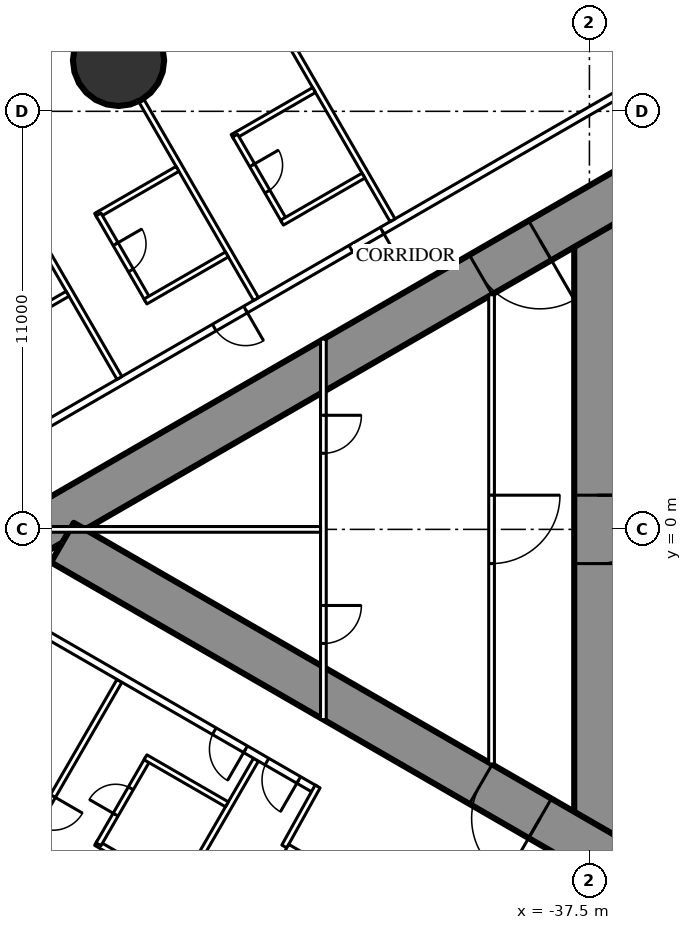
"""IFC4 building model, lengths in metres.
Left out: names, types, materials, properties, quantities, classifications, styles, units other than length and angle.
Written with IfcOpenShell. Run it as: python <this file> out.ifc"""

import sys

from ifc_helpers import new_model, si_unit, direction, frame, frame_2d, origin, origin_2d, place, context, subcontext, project, spatial, rectangle, circle, extrude, element, fill, save


model = new_model("IFC4")
c1 = context("Model", 3, precision=1e-05, world=origin(), true_north=direction((0.0, 1.0)))
c2 = subcontext(c1, "Body", "Model", "MODEL_VIEW")
j1 = project(units=[si_unit("LENGTHUNIT", "METRE"), si_unit("PLANEANGLEUNIT", "RADIAN")], contexts=[c1])
p1 = place(None, origin())
s1 = spatial("IfcSite", under=j1, at=p1, CompositionType="ELEMENT")
p2 = place(p1, origin())
s2 = spatial("IfcBuilding", under=s1, at=p2, CompositionType="ELEMENT")
p3 = place(p2, frame((0.0, 0.0, 218.9)))
s3 = spatial("IfcBuildingStorey", under=s2, at=p3, CompositionType="ELEMENT", Elevation=218.9)
p4 = place(p3, frame((-49.89, 12.34, 0.0), z_axis=(0.0, 0.0, 1.0), x_axis=(1.0, 0.0, 0.0)))
e1 = element("IfcColumn", 1, at=p4, inside=s3, PredefinedType="COLUMN", context=c2, shape_type="SweptSolid", body=[
    extrude(circle(Radius=1.2, at=origin_2d()), origin(), (0.0, 0.0, 1.0), 3.6),
])
p5 = place(p3, frame((-37.3, 8.6, 0.0), z_axis=(0.0, 0.0, 1.0), x_axis=(0.0, -1.0, 0.0)))
e2 = element("IfcWall", 2, at=p5, inside=s3, PredefinedType="SHEAR", context=c2, shape_type="SweptSolid", body=[
    extrude(rectangle(XDim=17.2, YDim=1.2, at=frame_2d((8.6, 0.0))), origin(), (0.0, 0.0, 1.0), 3.6),
])
p6 = place(p5, frame((7.7, 0.0, 0.0)))
e3 = element("IfcOpeningElement", 3, at=p6, cuts=e2, PredefinedType="OPENING", context=c2, shape_type="SweptSolid", body=[
    extrude(rectangle(XDim=1.8, YDim=2.2, at=frame_2d((0.9, 1.1))), frame((0.0, 0.61, 0.0), z_axis=(0.0, -1.0, 0.0), x_axis=(1.0, 0.0, 0.0)), (0.0, 0.0, 1.0), 1.22),
])
p7 = place(p3, frame((-27.2, 14.3, 0.0), z_axis=(0.0, 0.0, 1.0), x_axis=(-0.866026593062, -0.499997940104, 0.0)))
e4 = element("IfcWall", 4, at=p7, inside=s3, PredefinedType="SHEAR", context=c2, shape_type="SweptSolid", body=[
    extrude(rectangle(XDim=28.946, YDim=1.2, at=frame_2d((14.473, 0.0))), origin(), (0.0, 0.0, 1.0), 3.6),
])
p8 = place(p7, frame((4.6, 0.0, 0.0)))
e5 = element("IfcOpeningElement", 5, at=p8, cuts=e4, PredefinedType="OPENING", context=c2, shape_type="SweptSolid", body=[
    extrude(rectangle(XDim=1.0, YDim=2.2, at=frame_2d((0.5, 1.1))), frame((0.0, 0.61, 0.0), z_axis=(0.0, -1.0, 0.0), x_axis=(1.0, 0.0, 0.0)), (0.0, 0.0, 1.0), 1.22),
])
p9 = place(p7, frame((13.395, 0.0, 0.0)))
e6 = element("IfcOpeningElement", 6, at=p9, cuts=e4, PredefinedType="OPENING", context=c2, shape_type="SweptSolid", body=[
    extrude(rectangle(XDim=1.8, YDim=2.2, at=frame_2d((0.9, 1.1))), frame((0.0, 0.61, 0.0), z_axis=(0.0, -1.0, 0.0), x_axis=(1.0, 0.0, 0.0)), (0.0, 0.0, 1.0), 1.22),
])
p10 = place(p3, frame((-27.2, -14.3, 0.0), z_axis=(0.0, 0.0, 1.0), x_axis=(-0.866024021859, 0.500002393557, 0.0)))
e7 = element("IfcWall", 7, at=p10, inside=s3, PredefinedType="SHEAR", context=c2, shape_type="SweptSolid", body=[
    extrude(rectangle(XDim=27.907, YDim=1.2, at=frame_2d((13.954, 0.0))), origin(), (0.0, 0.0, 1.0), 3.6),
])
p11 = place(p10, frame((4.6, 0.0, 0.0)))
e8 = element("IfcOpeningElement", 8, at=p11, cuts=e7, PredefinedType="OPENING", context=c2, shape_type="SweptSolid", body=[
    extrude(rectangle(XDim=1.0, YDim=2.2, at=frame_2d((0.5, 1.1))), frame((0.0, 0.61, 0.0), z_axis=(0.0, -1.0, 0.0), x_axis=(1.0, 0.0, 0.0)), (0.0, 0.0, 1.0), 1.22),
])
p12 = place(p10, frame((13.395, 0.0, 0.0)))
e9 = element("IfcOpeningElement", 9, at=p12, cuts=e7, PredefinedType="OPENING", context=c2, shape_type="SweptSolid", body=[
    extrude(rectangle(XDim=1.8, YDim=2.2, at=frame_2d((0.9, 1.1))), frame((0.0, 0.61, 0.0), z_axis=(0.0, -1.0, 0.0), x_axis=(1.0, 0.0, 0.0)), (0.0, 0.0, 1.0), 1.22),
])
p13 = place(p3, frame((-28.737, 16.068, 0.0), z_axis=(0.0, 0.0, 1.0), x_axis=(-0.866026057212, -0.499998868229, 0.0)))
e10 = element("IfcWall", 10, at=p13, inside=s3, PredefinedType="PARTITIONING", context=c2, shape_type="SweptSolid", body=[
    extrude(rectangle(XDim=32.137, YDim=0.2, at=frame_2d((16.068, 0.0))), origin(), (0.0, 0.0, 1.0), 3.35),
])
p14 = place(p13, frame((1.08, 0.0, 0.0)))
e11 = element("IfcOpeningElement", 11, at=p14, cuts=e10, PredefinedType="OPENING", context=c2, shape_type="SweptSolid", body=[
    extrude(rectangle(XDim=1.8, YDim=2.03, at=frame_2d((0.9, 1.015))), frame((0.0, 0.11, 0.0), z_axis=(0.0, -1.0, 0.0), x_axis=(1.0, 0.0, 0.0)), (0.0, 0.0, 1.0), 0.22),
])
p15 = place(p13, frame((6.86, 0.0, 0.0)))
e12 = element("IfcOpeningElement", 12, at=p15, cuts=e10, PredefinedType="OPENING", context=c2, shape_type="SweptSolid", body=[
    extrude(rectangle(XDim=1.0, YDim=2.2, at=frame_2d((0.5, 1.1))), frame((0.0, 0.11, 0.0), z_axis=(0.0, -1.0, 0.0), x_axis=(1.0, 0.0, 0.0)), (0.0, 0.0, 1.0), 0.22),
])
p16 = place(p13, frame((16.418, 0.0, 0.0)))
e13 = element("IfcOpeningElement", 13, at=p16, cuts=e10, PredefinedType="OPENING", context=c2, shape_type="SweptSolid", body=[
    extrude(rectangle(XDim=0.95, YDim=2.2, at=frame_2d((0.475, 1.1))), frame((0.0, 0.11, 0.0), z_axis=(0.0, -1.0, 0.0), x_axis=(1.0, 0.0, 0.0)), (0.0, 0.0, 1.0), 0.22),
])
p17 = place(p13, frame((20.567, 0.0, 0.0)))
e14 = element("IfcOpeningElement", 14, at=p17, cuts=e10, PredefinedType="OPENING", context=c2, shape_type="SweptSolid", body=[
    extrude(rectangle(XDim=0.95, YDim=2.2, at=frame_2d((0.475, 1.1))), frame((0.0, 0.11, 0.0), z_axis=(0.0, -1.0, 0.0), x_axis=(1.0, 0.0, 0.0)), (0.0, 0.0, 1.0), 0.22),
])
p18 = place(p13, frame((27.065, 0.0, 0.0)))
e15 = element("IfcOpeningElement", 15, at=p18, cuts=e10, PredefinedType="OPENING", context=c2, shape_type="SweptSolid", body=[
    extrude(rectangle(XDim=0.95, YDim=2.2, at=frame_2d((0.475, 1.1))), frame((0.0, 0.11, 0.0), z_axis=(0.0, -1.0, 0.0), x_axis=(1.0, 0.0, 0.0)), (0.0, 0.0, 1.0), 0.22),
])
p19 = place(p3, frame((-42.68, 8.134, 0.0), z_axis=(0.0, 0.0, 1.0), x_axis=(-0.499984479505, 0.866034364361, 0.0)))
e16 = element("IfcWall", 16, at=p19, inside=s3, PredefinedType="PARTITIONING", context=c2, shape_type="SweptSolid", body=[
    extrude(rectangle(XDim=5.995, YDim=0.15, at=frame_2d((2.998, 0.0))), origin(), (0.0, 0.0, 1.0), 2.45),
])
p20 = place(p3, frame((-46.274, 6.059, 0.0), z_axis=(0.0, 0.0, 1.0), x_axis=(-0.500020471368, 0.866013584312, 0.0)))
e17 = element("IfcWall", 17, at=p20, inside=s3, PredefinedType="PARTITIONING", context=c2, shape_type="SweptSolid", body=[
    extrude(rectangle(XDim=6.028, YDim=0.15, at=frame_2d((3.014, 0.0))), origin(), (0.0, 0.0, 1.0), 2.45),
])
p21 = place(p3, frame((-49.866, 3.985, 0.0), z_axis=(0.0, 0.0, 1.0), x_axis=(-0.500000694566, 0.866025002776, 0.0)))
e18 = element("IfcWall", 18, at=p21, inside=s3, PredefinedType="PARTITIONING", context=c2, shape_type="SweptSolid", body=[
    extrude(rectangle(XDim=5.95, YDim=0.15, at=frame_2d((2.975, 0.0))), origin(), (0.0, 0.0, 1.0), 2.45),
])
p22 = place(p3, frame((-46.274, -6.059, 0.0), z_axis=(0.0, 0.0, 1.0), x_axis=(-0.500020471368, -0.866013584312, 0.0)))
e19 = element("IfcWall", 19, at=p22, inside=s3, PredefinedType="PARTITIONING", context=c2, shape_type="SweptSolid", body=[
    extrude(rectangle(XDim=6.028, YDim=0.15, at=frame_2d((3.014, 0.0))), origin(), (0.0, 0.0, 1.0), 2.45),
])
p23 = place(p3, frame((-49.866, -3.985, 0.0), z_axis=(0.0, 0.0, 1.0), x_axis=(-0.500000694566, -0.866025002776, 0.0)))
e20 = element("IfcWall", 20, at=p23, inside=s3, PredefinedType="PARTITIONING", context=c2, shape_type="SweptSolid", body=[
    extrude(rectangle(XDim=5.95, YDim=0.15, at=frame_2d((2.975, 0.0))), origin(), (0.0, 0.0, 1.0), 2.45),
])
p24 = place(p23, frame((3.5, 0.0, 0.0)))
e21 = element("IfcOpeningElement", 21, at=p24, cuts=e20, PredefinedType="OPENING", context=c2, shape_type="SweptSolid", body=[
    extrude(rectangle(XDim=0.9, YDim=2.2, at=frame_2d((0.45, 1.1))), frame((0.0, 0.085, 0.0), z_axis=(0.0, -1.0, 0.0), x_axis=(1.0, 0.0, 0.0)), (0.0, 0.0, 1.0), 0.17),
])
p25 = place(p3, frame((-44.715, -6.844, 0.0), z_axis=(0.0, 0.0, 1.0), x_axis=(-0.866025261224, 0.500000246922, 0.0)))
e22 = element("IfcWall", 22, at=p25, inside=s3, PredefinedType="PARTITIONING", context=c2, shape_type="SweptSolid", body=[
    extrude(rectangle(XDim=13.567, YDim=0.2, at=frame_2d((6.783, 0.0))), origin(), (0.0, 0.0, 1.0), 3.35),
])
p26 = place(p25, frame((9.667, 0.0, 0.0)))
e23 = element("IfcOpeningElement", 23, at=p26, cuts=e22, PredefinedType="OPENING", context=c2, shape_type="SweptSolid", body=[
    extrude(rectangle(XDim=0.95, YDim=2.2, at=frame_2d((0.475, 1.1))), frame((0.0, 0.11, 0.0), z_axis=(0.0, -1.0, 0.0), x_axis=(1.0, 0.0, 0.0)), (0.0, 0.0, 1.0), 0.22),
])
p27 = place(p25, frame((2.117, 0.0, 0.0)))
e24 = element("IfcOpeningElement", 24, at=p27, cuts=e22, PredefinedType="OPENING", context=c2, shape_type="SweptSolid", body=[
    extrude(rectangle(XDim=0.95, YDim=2.2, at=frame_2d((0.475, 1.1))), frame((0.0, 0.11, 0.0), z_axis=(0.0, -1.0, 0.0), x_axis=(1.0, 0.0, 0.0)), (0.0, 0.0, 1.0), 0.22),
])
p28 = place(p25, frame((0.5, 0.0, 0.0)))
e25 = element("IfcOpeningElement", 25, at=p28, cuts=e22, PredefinedType="OPENING", context=c2, shape_type="SweptSolid", body=[
    extrude(rectangle(XDim=0.967, YDim=2.2, at=frame_2d((0.483, 1.1))), frame((0.0, 0.11, 0.0), z_axis=(0.0, -1.0, 0.0), x_axis=(1.0, 0.0, 0.0)), (0.0, 0.0, 1.0), 0.22),
])
p29 = place(p3, frame((-44.652, -6.764, 0.0), z_axis=(0.0, 0.0, 1.0), x_axis=(-0.485424724123, -0.874278466629, 0.0)))
e26 = element("IfcWall", 26, at=p29, inside=s3, PredefinedType="PARTITIONING", context=c2, shape_type="SweptSolid", body=[
    extrude(rectangle(XDim=1.805, YDim=0.15, at=frame_2d((0.903, 0.0))), origin(), (0.0, 0.0, 1.0), 3.35),
])
p30 = place(p3, frame((-44.745, 11.56, 0.0), z_axis=(0.0, 0.0, 1.0), x_axis=(-0.866006523861, -0.500032699561, 0.0)))
e27 = element("IfcWall", 27, at=p30, inside=s3, PredefinedType="PARTITIONING", context=c2, shape_type="SweptSolid", body=[
    extrude(rectangle(XDim=2.475, YDim=0.15, at=frame_2d((1.237, 0.0))), origin(), (0.0, 0.0, 1.0), 3.35),
])
p31 = place(p3, frame((-45.524, 8.109, 0.0), z_axis=(0.0, 0.0, 1.0), x_axis=(-0.49997716683, 0.86603858612, 0.0)))
e28 = element("IfcWall", 28, at=p31, inside=s3, PredefinedType="PARTITIONING", context=c2, shape_type="SweptSolid", body=[
    extrude(rectangle(XDim=2.6, YDim=0.15, at=frame_2d((1.3, 0.0))), origin(), (0.0, 0.0, 1.0), 3.35),
])
p32 = place(p31, frame((0.9, 0.0, 0.0)))
e29 = element("IfcOpeningElement", 29, at=p32, cuts=e28, PredefinedType="OPENING", context=c2, shape_type="SweptSolid", body=[
    extrude(rectangle(XDim=0.8, YDim=2.2, at=frame_2d((0.4, 1.1))), frame((0.0, 0.085, 0.0), z_axis=(0.0, -1.0, 0.0), x_axis=(1.0, 0.0, 0.0)), (0.0, 0.0, 1.0), 0.17),
])
p33 = place(p3, frame((-43.445, 9.309, 0.0), z_axis=(0.0, 0.0, 1.0), x_axis=(-0.866031185235, -0.4999899861, 0.0)))
e30 = element("IfcWall", 30, at=p33, inside=s3, PredefinedType="PARTITIONING", context=c2, shape_type="SweptSolid", body=[
    extrude(rectangle(XDim=2.475, YDim=0.15, at=frame_2d((1.238, 0.0))), origin(), (0.0, 0.0, 1.0), 3.35),
])
p34 = place(p3, frame((-48.339, 9.486, 0.0), z_axis=(0.0, 0.0, 1.0), x_axis=(-0.866006523861, -0.500032699561, 0.0)))
e31 = element("IfcWall", 31, at=p34, inside=s3, PredefinedType="PARTITIONING", context=c2, shape_type="SweptSolid", body=[
    extrude(rectangle(XDim=2.475, YDim=0.15, at=frame_2d((1.237, 0.0))), origin(), (0.0, 0.0, 1.0), 3.35),
])
p35 = place(p3, frame((-49.117, 6.034, 0.0), z_axis=(0.0, 0.0, 1.0), x_axis=(-0.500006934395, 0.866021400173, 0.0)))
e32 = element("IfcWall", 32, at=p35, inside=s3, PredefinedType="PARTITIONING", context=c2, shape_type="SweptSolid", body=[
    extrude(rectangle(XDim=2.6, YDim=0.15, at=frame_2d((1.3, 0.0))), origin(), (0.0, 0.0, 1.0), 3.35),
])
p36 = place(p35, frame((0.9, 0.0, 0.0)))
e33 = element("IfcOpeningElement", 33, at=p36, cuts=e32, PredefinedType="OPENING", context=c2, shape_type="SweptSolid", body=[
    extrude(rectangle(XDim=0.8, YDim=2.2, at=frame_2d((0.4, 1.1))), frame((0.0, 0.085, 0.0), z_axis=(0.0, -1.0, 0.0), x_axis=(1.0, 0.0, 0.0)), (0.0, 0.0, 1.0), 0.17),
])
for number, where, z_axis, x_axis in (
    (34, (-47.039, 7.234, 0.0), (0.0, 0.0, 1.0), (-0.866, -0.5, 0.0)),
    (35, (-51.231, 6.199, 0.0), (0.0, 0.0, 1.0), (-0.866, -0.5, 0.0)),
):
    element("IfcWall", number, at=place(p3, frame(where, z_axis=z_axis, x_axis=x_axis)), inside=s3, PredefinedType="PARTITIONING", context=c2, shape_type="SweptSolid", body=[
        extrude(rectangle(XDim=2.475, YDim=0.15, at=frame_2d((1.238, 0.0))), origin(), (0.0, 0.0, 1.0), 3.35),
    ])
p37 = place(p3, frame((-48.339, -9.486, 0.0), z_axis=(0.0, 0.0, 1.0), x_axis=(-0.866006523861, 0.500032699561, 0.0)))
e36 = element("IfcWall", 36, at=p37, inside=s3, PredefinedType="PARTITIONING", context=c2, shape_type="SweptSolid", body=[
    extrude(rectangle(XDim=2.475, YDim=0.15, at=frame_2d((1.237, 0.0))), origin(), (0.0, 0.0, 1.0), 3.35),
])
p38 = place(p3, frame((-49.117, -6.034, 0.0), z_axis=(0.0, 0.0, 1.0), x_axis=(-0.500006934395, -0.866021400173, 0.0)))
e37 = element("IfcWall", 37, at=p38, inside=s3, PredefinedType="PARTITIONING", context=c2, shape_type="SweptSolid", body=[
    extrude(rectangle(XDim=2.6, YDim=0.15, at=frame_2d((1.3, 0.0))), origin(), (0.0, 0.0, 1.0), 3.35),
])
p39 = place(p38, frame((0.9, 0.0, 0.0)))
e38 = element("IfcOpeningElement", 38, at=p39, cuts=e37, PredefinedType="OPENING", context=c2, shape_type="SweptSolid", body=[
    extrude(rectangle(XDim=0.8, YDim=2.2, at=frame_2d((0.4, 1.1))), frame((0.0, 0.085, 0.0), z_axis=(0.0, -1.0, 0.0), x_axis=(1.0, 0.0, 0.0)), (0.0, 0.0, 1.0), 0.17),
])
p40 = place(p3, frame((-47.039, -7.234, 0.0), z_axis=(0.0, 0.0, 1.0), x_axis=(-0.866073894602, 0.499916002032, 0.0)))
e39 = element("IfcWall", 39, at=p40, inside=s3, PredefinedType="PARTITIONING", context=c2, shape_type="SweptSolid", body=[
    extrude(rectangle(XDim=2.475, YDim=0.15, at=frame_2d((1.238, 0.0))), origin(), (0.0, 0.0, 1.0), 2.5),
])
p41 = place(p3, frame((-40.075, 6.174, 0.0), z_axis=(0.0, 0.0, 1.0), x_axis=(0.0, -1.0, 0.0)))
e40 = element("IfcWall", 40, at=p41, inside=s3, PredefinedType="PARTITIONING", context=c2, shape_type="SweptSolid", body=[
    extrude(rectangle(XDim=12.348, YDim=0.15, at=frame_2d((6.174, 0.0))), origin(), (0.0, 0.0, 1.0), 3.35),
])
p42 = place(p41, frame((5.274, 0.0, 0.0)))
e41 = element("IfcOpeningElement", 41, at=p42, cuts=e40, PredefinedType="OPENING", context=c2, shape_type="SweptSolid", body=[
    extrude(rectangle(XDim=1.8, YDim=2.2, at=frame_2d((0.9, 1.1))), frame((0.0, 0.085, 0.0), z_axis=(0.0, -1.0, 0.0), x_axis=(1.0, 0.0, 0.0)), (0.0, 0.0, 1.0), 0.17),
])
p43 = place(p3, frame((-44.5, 5.005, 0.0), z_axis=(0.0, 0.0, 1.0), x_axis=(0.0, -1.0, 0.0)))
e42 = element("IfcWall", 42, at=p43, inside=s3, PredefinedType="PARTITIONING", context=c2, shape_type="SweptSolid", body=[
    extrude(rectangle(XDim=10.009, YDim=0.15, at=frame_2d((5.005, 0.0))), origin(), (0.0, 0.0, 1.0), 2.5),
])
p44 = place(p43, frame((2.002, 0.0, 0.0)))
e43 = element("IfcOpeningElement", 43, at=p44, cuts=e42, PredefinedType="OPENING", context=c2, shape_type="SweptSolid", body=[
    extrude(rectangle(XDim=1.0, YDim=2.2, at=frame_2d((0.5, 1.1))), frame((0.0, 0.085, 0.0), z_axis=(0.0, -1.0, 0.0), x_axis=(1.0, 0.0, 0.0)), (0.0, 0.0, 1.0), 0.17),
])
p45 = place(p43, frame((7.007, 0.0, 0.0)))
e44 = element("IfcOpeningElement", 44, at=p45, cuts=e42, PredefinedType="OPENING", context=c2, shape_type="SweptSolid", body=[
    extrude(rectangle(XDim=1.0, YDim=2.2, at=frame_2d((0.5, 1.1))), frame((0.0, 0.085, 0.0), z_axis=(0.0, -1.0, 0.0), x_axis=(1.0, 0.0, 0.0)), (0.0, 0.0, 1.0), 0.17),
])
p46 = place(p3, frame((-44.575, 0.0, 0.0), z_axis=(0.0, 0.0, 1.0), x_axis=(-1.0, 0.0, 0.0)))
e45 = element("IfcWall", 45, at=p46, inside=s3, PredefinedType="PARTITIONING", context=c2, shape_type="SweptSolid", body=[
    extrude(rectangle(XDim=8.593, YDim=0.15, at=frame_2d((4.297, 0.0))), origin(), (0.0, 0.0, 1.0), 2.45),
])
p47 = place(p3, frame((-39.758, -11.697, 0.0), z_axis=(0.0, 0.0, 1.0), x_axis=(-0.866024194504, 0.500002094529, 0.0)))
e46 = element("IfcWall", 46, at=p47, inside=s3, PredefinedType="PARTITIONING", context=c2, shape_type="SweptSolid", body=[
    extrude(rectangle(XDim=6.6, YDim=0.25, at=frame_2d((3.3, 0.0))), origin(), (0.0, 0.0, 1.0), 3.35),
])
p48 = place(p47, frame((0.75, 0.0, 0.0)))
e47 = element("IfcOpeningElement", 47, at=p48, cuts=e46, PredefinedType="OPENING", context=c2, shape_type="SweptSolid", body=[
    extrude(rectangle(XDim=1.1, YDim=2.2, at=frame_2d((0.55, 1.1))), frame((0.0, 0.135, 0.0), z_axis=(0.0, -1.0, 0.0), x_axis=(1.0, 0.0, 0.0)), (0.0, 0.0, 1.0), 0.27),
])
p49 = place(p47, frame((2.75, 0.0, 0.0)))
e48 = element("IfcOpeningElement", 48, at=p49, cuts=e46, PredefinedType="OPENING", context=c2, shape_type="SweptSolid", body=[
    extrude(rectangle(XDim=1.1, YDim=2.2, at=frame_2d((0.55, 1.1))), frame((0.0, 0.135, 0.0), z_axis=(0.0, -1.0, 0.0), x_axis=(1.0, 0.0, 0.0)), (0.0, 0.0, 1.0), 0.27),
])
p50 = place(p47, frame((4.75, 0.0, 0.0)))
e49 = element("IfcOpeningElement", 49, at=p50, cuts=e46, PredefinedType="OPENING", context=c2, shape_type="SweptSolid", body=[
    extrude(rectangle(XDim=1.1, YDim=2.2, at=frame_2d((0.55, 1.1))), frame((0.0, 0.135, 0.0), z_axis=(0.0, -1.0, 0.0), x_axis=(1.0, 0.0, 0.0)), (0.0, 0.0, 1.0), 0.27),
])
p51 = place(p32, origin())
e50 = element("IfcDoor", 50, at=p51, inside=s3, OperationType="SINGLE_SWING_RIGHT", PredefinedType="DOOR", context=c2, shape_type="SweptSolid", body=[
    extrude(rectangle(XDim=0.8, YDim=2.2, at=frame_2d((0.4, 1.1))), frame((0.0, 0.025, 0.0), z_axis=(0.0, -1.0, 0.0), x_axis=(1.0, 0.0, 0.0)), (0.0, 0.0, 1.0), 0.05),
])
fill(e29, e50)
p52 = place(p16, origin())
e51 = element("IfcDoor", 51, at=p52, inside=s3, OperationType="SINGLE_SWING_LEFT", PredefinedType="DOOR", context=c2, shape_type="SweptSolid", body=[
    extrude(rectangle(XDim=0.95, YDim=2.2, at=frame_2d((0.475, 1.1))), frame((0.0, 0.025, 0.0), z_axis=(0.0, -1.0, 0.0), x_axis=(1.0, 0.0, 0.0)), (0.0, 0.0, 1.0), 0.05),
])
fill(e13, e51)
p53 = place(p36, origin())
e52 = element("IfcDoor", 52, at=p53, inside=s3, OperationType="SINGLE_SWING_RIGHT", PredefinedType="DOOR", context=c2, shape_type="SweptSolid", body=[
    extrude(rectangle(XDim=0.8, YDim=2.2, at=frame_2d((0.4, 1.1))), frame((0.0, 0.025, 0.0), z_axis=(0.0, -1.0, 0.0), x_axis=(1.0, 0.0, 0.0)), (0.0, 0.0, 1.0), 0.05),
])
fill(e33, e52)
p54 = place(p17, origin())
e53 = element("IfcDoor", 53, at=p54, inside=s3, OperationType="SINGLE_SWING_LEFT", PredefinedType="DOOR", context=c2, shape_type="SweptSolid", body=[
    extrude(rectangle(XDim=0.95, YDim=2.2, at=frame_2d((0.475, 1.1))), frame((0.0, 0.025, 0.0), z_axis=(0.0, -1.0, 0.0), x_axis=(1.0, 0.0, 0.0)), (0.0, 0.0, 1.0), 0.05),
])
fill(e14, e53)
p55 = place(p39, origin())
e54 = element("IfcDoor", 54, at=p55, inside=s3, OperationType="SINGLE_SWING_RIGHT", PredefinedType="DOOR", context=c2, shape_type="SweptSolid", body=[
    extrude(rectangle(XDim=0.8, YDim=2.2, at=frame_2d((0.4, 1.1))), frame((0.0, 0.025, 0.0), z_axis=(0.0, -1.0, 0.0), x_axis=(1.0, 0.0, 0.0)), (0.0, 0.0, 1.0), 0.05),
])
fill(e38, e54)
p56 = place(p27, origin())
e55 = element("IfcDoor", 55, at=p56, inside=s3, OperationType="SINGLE_SWING_LEFT", PredefinedType="DOOR", context=c2, shape_type="SweptSolid", body=[
    extrude(rectangle(XDim=0.95, YDim=2.2, at=frame_2d((0.475, 1.1))), frame((0.0, 0.025, 0.0), z_axis=(0.0, -1.0, 0.0), x_axis=(1.0, 0.0, 0.0)), (0.0, 0.0, 1.0), 0.05),
])
fill(e24, e55)
p57 = place(p28, origin())
e56 = element("IfcDoor", 56, at=p57, inside=s3, OperationType="SINGLE_SWING_LEFT", PredefinedType="DOOR", context=c2, shape_type="SweptSolid", body=[
    extrude(rectangle(XDim=0.967, YDim=2.2, at=frame_2d((0.483, 1.1))), frame((0.0, 0.025, 0.0), z_axis=(0.0, -1.0, 0.0), x_axis=(1.0, 0.0, 0.0)), (0.0, 0.0, 1.0), 0.05),
])
fill(e25, e56)
p58 = place(p24, origin())
e57 = element("IfcDoor", 57, at=p58, inside=s3, OperationType="SINGLE_SWING_LEFT", PredefinedType="DOOR", context=c2, shape_type="SweptSolid", body=[
    extrude(rectangle(XDim=0.9, YDim=2.2, at=frame_2d((0.45, 1.1))), frame((0.0, 0.025, 0.0), z_axis=(0.0, -1.0, 0.0), x_axis=(1.0, 0.0, 0.0)), (0.0, 0.0, 1.0), 0.05),
])
fill(e21, e57)
p59 = place(p42, origin())
e58 = element("IfcDoor", 58, at=p59, inside=s3, OperationType="DOUBLE_DOOR_SINGLE_SWING", PredefinedType="DOOR", context=c2, shape_type="SweptSolid", body=[
    extrude(rectangle(XDim=1.8, YDim=2.2, at=frame_2d((0.9, 1.1))), frame((0.0, 0.025, 0.0), z_axis=(0.0, -1.0, 0.0), x_axis=(1.0, 0.0, 0.0)), (0.0, 0.0, 1.0), 0.05),
])
fill(e41, e58)
p60 = place(p44, origin())
e59 = element("IfcDoor", 59, at=p60, inside=s3, OperationType="SINGLE_SWING_LEFT", PredefinedType="DOOR", context=c2, shape_type="SweptSolid", body=[
    extrude(rectangle(XDim=1.0, YDim=2.2, at=frame_2d((0.5, 1.1))), frame((0.0, 0.025, 0.0), z_axis=(0.0, -1.0, 0.0), x_axis=(1.0, 0.0, 0.0)), (0.0, 0.0, 1.0), 0.05),
])
fill(e43, e59)
p61 = place(p45, origin())
e60 = element("IfcDoor", 60, at=p61, inside=s3, OperationType="SINGLE_SWING_LEFT", PredefinedType="DOOR", context=c2, shape_type="SweptSolid", body=[
    extrude(rectangle(XDim=1.0, YDim=2.2, at=frame_2d((0.5, 1.1))), frame((0.0, 0.025, 0.0), z_axis=(0.0, -1.0, 0.0), x_axis=(1.0, 0.0, 0.0)), (0.0, 0.0, 1.0), 0.05),
])
fill(e44, e60)
p62 = place(p9, origin())
e61 = element("IfcDoor", 61, at=p62, inside=s3, OperationType="DOUBLE_DOOR_SINGLE_SWING", PredefinedType="DOOR", context=c2, shape_type="SweptSolid", body=[
    extrude(rectangle(XDim=1.8, YDim=2.2, at=frame_2d((0.9, 1.1))), frame((0.0, 0.025, 0.0), z_axis=(0.0, -1.0, 0.0), x_axis=(1.0, 0.0, 0.0)), (0.0, 0.0, 1.0), 0.05),
])
fill(e6, e61)
p63 = place(p12, origin())
e62 = element("IfcDoor", 62, at=p63, inside=s3, OperationType="DOUBLE_DOOR_SINGLE_SWING", PredefinedType="DOOR", context=c2, shape_type="SweptSolid", body=[
    extrude(rectangle(XDim=1.8, YDim=2.2, at=frame_2d((0.9, 1.1))), frame((0.0, 0.025, 0.0), z_axis=(0.0, -1.0, 0.0), x_axis=(1.0, 0.0, 0.0)), (0.0, 0.0, 1.0), 0.05),
])
fill(e9, e62)
p64 = place(p6, origin())
e63 = element("IfcDoor", 63, at=p64, inside=s3, OperationType="DOUBLE_DOOR_SINGLE_SWING", PredefinedType="DOOR", context=c2, shape_type="SweptSolid", body=[
    extrude(rectangle(XDim=1.8, YDim=2.2, at=frame_2d((0.9, 1.1))), frame((0.0, 0.025, 0.0), z_axis=(0.0, -1.0, 0.0), x_axis=(1.0, 0.0, 0.0)), (0.0, 0.0, 1.0), 0.05),
])
fill(e3, e63)
save(model, sys.argv[1])
